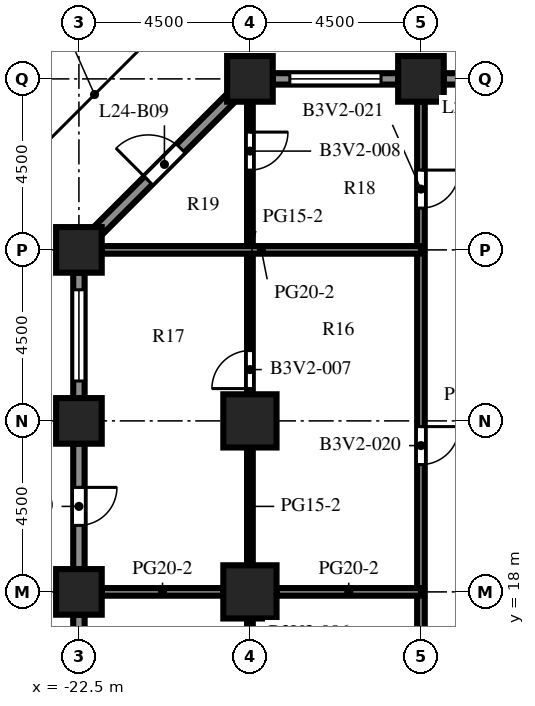
"""IFC4 building model, lengths in metres.
Left out: names, types, materials, properties, quantities, classifications, styles, units other than length and angle.
Written with IfcOpenShell. Run it as: python <this file> out.ifc"""

import sys

from ifc_helpers import new_model, si_unit, direction, frame, frame_2d, origin, origin_2d, place, context, subcontext, project, spatial, rectangle, extrude, element, fill, save


model = new_model("IFC4")
c1 = context("Model", 3, precision=1e-05, world=origin(), true_north=direction((0.0, 1.0)))
c2 = subcontext(c1, "Body", "Model", "MODEL_VIEW")
j1 = project(units=[si_unit("LENGTHUNIT", "METRE"), si_unit("PLANEANGLEUNIT", "RADIAN")], contexts=[c1])
p1 = place(None, origin())
s1 = spatial("IfcSite", under=j1, at=p1, CompositionType="ELEMENT")
p2 = place(p1, origin())
s2 = spatial("IfcBuilding", under=s1, at=p2, CompositionType="ELEMENT")
p3 = place(p2, frame((0.0, 0.0, 106.6)))
s3 = spatial("IfcBuildingStorey", under=s2, at=p3, CompositionType="ELEMENT", Elevation=106.6)
for number, where, z_axis, x_axis in (
    (1, (-22.5, 18.0, 0.0), (0.0, 0.0, 1.0), (1.0, 0.0, 0.0)),
    (2, (-22.5, 22.5, 0.0), (0.0, 0.0, 1.0), (1.0, 0.0, 0.0)),
    (3, (-22.5, 27.0, 0.0), (0.0, 0.0, 1.0), (1.0, 0.0, 0.0)),
    (4, (-18.0, 31.5, 0.0), (0.0, 0.0, 1.0), (1.0, 0.0, 0.0)),
    (5, (-13.5, 31.5, 0.0), (0.0, 0.0, 1.0), (1.0, 0.0, 0.0)),
):
    element("IfcColumn", number, at=place(p3, frame(where, z_axis=z_axis, x_axis=x_axis)), inside=s3, PredefinedType="COLUMN", context=c2, shape_type="SweptSolid", body=[
        extrude(rectangle(XDim=1.2, YDim=1.2, at=origin_2d()), origin(), (0.0, 0.0, 1.0), 4.1),
    ])
for number, where, z_axis, x_axis in (
    (6, (-18.0, 18.0, 0.0), (0.0, 0.0, 1.0), (1.0, 0.0, 0.0)),
    (7, (-18.0, 22.5, 0.0), (0.0, 0.0, 1.0), (1.0, 0.0, 0.0)),
):
    element("IfcColumn", number, at=place(p3, frame(where, z_axis=z_axis, x_axis=x_axis)), inside=s3, PredefinedType="COLUMN", context=c2, shape_type="SweptSolid", body=[
        extrude(rectangle(XDim=1.4, YDim=1.4, at=origin_2d()), origin(), (0.0, 0.0, 1.0), 4.1),
    ])
p4 = place(p3, frame((-12.9, 31.5, 0.0), z_axis=(0.0, 0.0, 1.0), x_axis=(1.0, 0.0, 0.0)))
e8 = element("IfcWall", 8, at=p4, inside=s3, PredefinedType="SOLIDWALL", context=c2, shape_type="SweptSolid", body=[
    extrude(rectangle(XDim=3.3, YDim=0.3, at=frame_2d((1.65, 0.0))), origin(), (0.0, 0.0, 1.0), 2.6),
])
p5 = place(p4, frame((1.15, 0.0, 0.0)))
e9 = element("IfcOpeningElement", 9, at=p5, cuts=e8, PredefinedType="OPENING", context=c2, shape_type="SweptSolid", body=[
    extrude(rectangle(XDim=1.0, YDim=2.2, at=frame_2d((0.5, 1.1))), frame((0.0, 0.16, 0.0), z_axis=(0.0, -1.0, 0.0), x_axis=(1.0, 0.0, 0.0)), (0.0, 0.0, 1.0), 0.32),
])
p6 = place(p3, frame((-17.4, 31.5, 0.0), z_axis=(0.0, 0.0, 1.0), x_axis=(1.0, 0.0, 0.0)))
e10 = element("IfcWall", 10, at=p6, inside=s3, PredefinedType="SOLIDWALL", context=c2, shape_type="SweptSolid", body=[
    extrude(rectangle(XDim=3.3, YDim=0.3, at=frame_2d((1.65, 0.0))), origin(), (0.0, 0.0, 1.0), 2.6),
])
p7 = place(p6, frame((0.45, 0.0, 0.8)))
e11 = element("IfcOpeningElement", 11, at=p7, cuts=e10, PredefinedType="OPENING", context=c2, shape_type="SweptSolid", body=[
    extrude(rectangle(XDim=2.4, YDim=1.7, at=frame_2d((1.2, 0.85))), frame((0.0, 0.16, 0.0), z_axis=(0.0, -1.0, 0.0), x_axis=(1.0, 0.0, 0.0)), (0.0, 0.0, 1.0), 0.32),
])
p8 = place(p3, frame((-22.006, 27.494, 0.0), z_axis=(0.0, 0.0, 1.0), x_axis=(0.707106781187, 0.707106781187, 0.0)))
e12 = element("IfcWall", 12, at=p8, inside=s3, PredefinedType="SOLIDWALL", context=c2, shape_type="SweptSolid", body=[
    extrude(rectangle(XDim=4.967, YDim=0.3, at=frame_2d((2.483, 0.0))), origin(), (0.0, 0.0, 1.0), 2.6),
])
p9 = place(p8, frame((1.884, 0.0, 0.0)))
e13 = element("IfcOpeningElement", 13, at=p9, cuts=e12, PredefinedType="OPENING", context=c2, shape_type="SweptSolid", body=[
    extrude(rectangle(XDim=1.2, YDim=2.2, at=frame_2d((0.6, 1.1))), frame((0.0, 0.16, 0.0), z_axis=(0.0, -1.0, 0.0), x_axis=(1.0, 0.0, 0.0)), (0.0, 0.0, 1.0), 0.32),
])
p10 = place(p3, frame((-22.5, 23.1, 0.0), z_axis=(0.0, 0.0, 1.0), x_axis=(0.0, 1.0, 0.0)))
e14 = element("IfcWall", 14, at=p10, inside=s3, PredefinedType="SOLIDWALL", context=c2, shape_type="SweptSolid", body=[
    extrude(rectangle(XDim=3.3, YDim=0.3, at=frame_2d((1.65, 0.0))), origin(), (0.0, 0.0, 1.0), 2.6),
])
p11 = place(p10, frame((0.45, 0.0, 0.8)))
e15 = element("IfcOpeningElement", 15, at=p11, cuts=e14, PredefinedType="OPENING", context=c2, shape_type="SweptSolid", body=[
    extrude(rectangle(XDim=2.4, YDim=1.7, at=frame_2d((1.2, 0.85))), frame((0.0, 0.16, 0.0), z_axis=(0.0, -1.0, 0.0), x_axis=(1.0, 0.0, 0.0)), (0.0, 0.0, 1.0), 0.32),
])
p12 = place(p3, frame((-22.5, 18.6, 0.0), z_axis=(0.0, 0.0, 1.0), x_axis=(0.0, 1.0, 0.0)))
e16 = element("IfcWall", 16, at=p12, inside=s3, PredefinedType="SOLIDWALL", context=c2, shape_type="SweptSolid", body=[
    extrude(rectangle(XDim=3.3, YDim=0.3, at=frame_2d((1.65, 0.0))), origin(), (0.0, 0.0, 1.0), 2.6),
])
p13 = place(p12, frame((1.15, 0.0, 0.0)))
e17 = element("IfcOpeningElement", 17, at=p13, cuts=e16, PredefinedType="OPENING", context=c2, shape_type="SweptSolid", body=[
    extrude(rectangle(XDim=1.0, YDim=2.2, at=frame_2d((0.5, 1.1))), frame((0.0, 0.16, 0.0), z_axis=(0.0, -1.0, 0.0), x_axis=(1.0, 0.0, 0.0)), (0.0, 0.0, 1.0), 0.32),
])
p14 = place(p3, frame((-22.5, 14.1, 0.0), z_axis=(0.0, 0.0, 1.0), x_axis=(0.0, 1.0, 0.0)))
e18 = element("IfcWall", 18, at=p14, inside=s3, PredefinedType="SOLIDWALL", context=c2, shape_type="SweptSolid", body=[
    extrude(rectangle(XDim=3.3, YDim=0.3, at=frame_2d((1.65, 0.0))), origin(), (0.0, 0.0, 1.0), 2.6),
])
p15 = place(p14, frame((0.45, 0.0, 0.8)))
e19 = element("IfcOpeningElement", 19, at=p15, cuts=e18, PredefinedType="OPENING", context=c2, shape_type="SweptSolid", body=[
    extrude(rectangle(XDim=2.4, YDim=1.7, at=frame_2d((1.2, 0.85))), frame((0.0, 0.16, 0.0), z_axis=(0.0, -1.0, 0.0), x_axis=(1.0, 0.0, 0.0)), (0.0, 0.0, 1.0), 0.32),
])
p16 = place(p3, frame((-18.0, 9.7, 0.0), z_axis=(0.0, 0.0, 1.0), x_axis=(0.0, 1.0, 0.0)))
e20 = element("IfcWall", 20, at=p16, inside=s3, PredefinedType="PARTITIONING", context=c2, shape_type="SweptSolid", body=[
    extrude(rectangle(XDim=7.6, YDim=0.15, at=frame_2d((3.8, 0.0))), origin(), (0.0, 0.0, 1.0), 3.5),
])
p17 = place(p16, frame((5.15, 0.0, 0.0)))
e21 = element("IfcOpeningElement", 21, at=p17, cuts=e20, PredefinedType="OPENING", context=c2, shape_type="SweptSolid", body=[
    extrude(rectangle(XDim=1.0, YDim=2.1, at=frame_2d((0.5, 1.05))), frame((0.0, 0.085, 0.0), z_axis=(0.0, -1.0, 0.0), x_axis=(1.0, 0.0, 0.0)), (0.0, 0.0, 1.0), 0.17),
])
p18 = place(p3, frame((-18.0, 18.7, 0.0), z_axis=(0.0, 0.0, 1.0), x_axis=(0.0, 1.0, 0.0)))
e22 = element("IfcWall", 22, at=p18, inside=s3, PredefinedType="PARTITIONING", context=c2, shape_type="SweptSolid", body=[
    extrude(rectangle(XDim=3.1, YDim=0.15, at=frame_2d((1.55, 0.0))), origin(), (0.0, 0.0, 1.0), 3.5),
])
p19 = place(p3, frame((-18.0, 23.2, 0.0), z_axis=(0.0, 0.0, 1.0), x_axis=(0.0, 1.0, 0.0)))
e23 = element("IfcWall", 23, at=p19, inside=s3, PredefinedType="PARTITIONING", context=c2, shape_type="SweptSolid", body=[
    extrude(rectangle(XDim=7.7, YDim=0.15, at=frame_2d((3.85, 0.0))), origin(), (0.0, 0.0, 1.0), 3.5),
])
p20 = place(p19, frame((0.15, 0.0, 0.0)))
e24 = element("IfcOpeningElement", 24, at=p20, cuts=e23, PredefinedType="OPENING", context=c2, shape_type="SweptSolid", body=[
    extrude(rectangle(XDim=1.0, YDim=2.1, at=frame_2d((0.5, 1.05))), frame((0.0, 0.085, 0.0), z_axis=(0.0, -1.0, 0.0), x_axis=(1.0, 0.0, 0.0)), (0.0, 0.0, 1.0), 0.17),
])
p21 = place(p19, frame((5.9, 0.0, 0.0)))
e25 = element("IfcOpeningElement", 25, at=p21, cuts=e23, PredefinedType="OPENING", context=c2, shape_type="SweptSolid", body=[
    extrude(rectangle(XDim=1.0, YDim=2.1, at=frame_2d((0.5, 1.05))), frame((0.0, 0.085, 0.0), z_axis=(0.0, -1.0, 0.0), x_axis=(1.0, 0.0, 0.0)), (0.0, 0.0, 1.0), 0.17),
])
p22 = place(p3, frame((-13.5, -21.9, 0.0), z_axis=(0.0, 0.0, 1.0), x_axis=(0.0, 1.0, 0.0)))
e26 = element("IfcWall", 26, at=p22, inside=s3, PredefinedType="PARTITIONING", context=c2, shape_type="SweptSolid", body=[
    extrude(rectangle(XDim=52.8, YDim=0.2, at=frame_2d((26.4, 0.0))), origin(), (0.0, 0.0, 1.0), 3.5),
])
p23 = place(p22, frame((0.75, 0.0, 0.0)))
e27 = element("IfcOpeningElement", 27, at=p23, cuts=e26, PredefinedType="OPENING", context=c2, shape_type="SweptSolid", body=[
    extrude(rectangle(XDim=1.0, YDim=2.1, at=frame_2d((0.5, 1.05))), frame((0.0, 0.11, 0.0), z_axis=(0.0, -1.0, 0.0), x_axis=(1.0, 0.0, 0.0)), (0.0, 0.0, 1.0), 0.22),
])
p24 = place(p22, frame((5.0, 0.0, 0.0)))
e28 = element("IfcOpeningElement", 28, at=p24, cuts=e26, PredefinedType="OPENING", context=c2, shape_type="SweptSolid", body=[
    extrude(rectangle(XDim=1.0, YDim=2.1, at=frame_2d((0.5, 1.05))), frame((0.0, 0.11, 0.0), z_axis=(0.0, -1.0, 0.0), x_axis=(1.0, 0.0, 0.0)), (0.0, 0.0, 1.0), 0.22),
])
p25 = place(p22, frame((12.5, 0.0, 0.0)))
e29 = element("IfcOpeningElement", 29, at=p25, cuts=e26, PredefinedType="OPENING", context=c2, shape_type="SweptSolid", body=[
    extrude(rectangle(XDim=1.0, YDim=2.1, at=frame_2d((0.5, 1.05))), frame((0.0, 0.11, 0.0), z_axis=(0.0, -1.0, 0.0), x_axis=(1.0, 0.0, 0.0)), (0.0, 0.0, 1.0), 0.22),
])
p26 = place(p22, frame((19.75, 0.0, 0.0)))
e30 = element("IfcOpeningElement", 30, at=p26, cuts=e26, PredefinedType="OPENING", context=c2, shape_type="SweptSolid", body=[
    extrude(rectangle(XDim=1.0, YDim=2.1, at=frame_2d((0.5, 1.05))), frame((0.0, 0.11, 0.0), z_axis=(0.0, -1.0, 0.0), x_axis=(1.0, 0.0, 0.0)), (0.0, 0.0, 1.0), 0.22),
])
p27 = place(p22, frame((26.0, 0.0, 0.0)))
e31 = element("IfcOpeningElement", 31, at=p27, cuts=e26, PredefinedType="OPENING", context=c2, shape_type="SweptSolid", body=[
    extrude(rectangle(XDim=1.0, YDim=2.1, at=frame_2d((0.5, 1.05))), frame((0.0, 0.11, 0.0), z_axis=(0.0, -1.0, 0.0), x_axis=(1.0, 0.0, 0.0)), (0.0, 0.0, 1.0), 0.22),
])
p28 = place(p22, frame((37.5, 0.0, 0.0)))
e32 = element("IfcOpeningElement", 32, at=p28, cuts=e26, PredefinedType="OPENING", context=c2, shape_type="SweptSolid", body=[
    extrude(rectangle(XDim=1.0, YDim=2.1, at=frame_2d((0.5, 1.05))), frame((0.0, 0.11, 0.0), z_axis=(0.0, -1.0, 0.0), x_axis=(1.0, 0.0, 0.0)), (0.0, 0.0, 1.0), 0.22),
])
p29 = place(p22, frame((43.25, 0.0, 0.0)))
e33 = element("IfcOpeningElement", 33, at=p29, cuts=e26, PredefinedType="OPENING", context=c2, shape_type="SweptSolid", body=[
    extrude(rectangle(XDim=1.0, YDim=2.1, at=frame_2d((0.5, 1.05))), frame((0.0, 0.11, 0.0), z_axis=(0.0, -1.0, 0.0), x_axis=(1.0, 0.0, 0.0)), (0.0, 0.0, 1.0), 0.22),
])
p30 = place(p22, frame((50.0, 0.0, 0.0)))
e34 = element("IfcOpeningElement", 34, at=p30, cuts=e26, PredefinedType="OPENING", context=c2, shape_type="SweptSolid", body=[
    extrude(rectangle(XDim=1.0, YDim=2.1, at=frame_2d((0.5, 1.05))), frame((0.0, 0.11, 0.0), z_axis=(0.0, -1.0, 0.0), x_axis=(1.0, 0.0, 0.0)), (0.0, 0.0, 1.0), 0.22),
])
p31 = place(p3, frame((-21.9, 18.0, 0.0), z_axis=(0.0, 0.0, 1.0), x_axis=(1.0, 0.0, 0.0)))
e35 = element("IfcWall", 35, at=p31, inside=s3, PredefinedType="PARTITIONING", context=c2, shape_type="SweptSolid", body=[
    extrude(rectangle(XDim=3.2, YDim=0.2, at=frame_2d((1.6, 0.0))), origin(), (0.0, 0.0, 1.0), 3.5),
])
p32 = place(p3, frame((-17.3, 18.0, 0.0), z_axis=(0.0, 0.0, 1.0), x_axis=(1.0, 0.0, 0.0)))
e36 = element("IfcWall", 36, at=p32, inside=s3, PredefinedType="PARTITIONING", context=c2, shape_type="SweptSolid", body=[
    extrude(rectangle(XDim=3.8, YDim=0.2, at=frame_2d((1.9, 0.0))), origin(), (0.0, 0.0, 1.0), 3.5),
])
p33 = place(p3, frame((-21.9, 27.0, 0.0), z_axis=(0.0, 0.0, 1.0), x_axis=(1.0, 0.0, 0.0)))
e37 = element("IfcWall", 37, at=p33, inside=s3, PredefinedType="PARTITIONING", context=c2, shape_type="SweptSolid", body=[
    extrude(rectangle(XDim=8.4, YDim=0.2, at=frame_2d((4.2, 0.0))), origin(), (0.0, 0.0, 1.0), 3.5),
])
p34 = place(p7, origin())
e38 = element("IfcWindow", 38, at=p34, inside=s3, PartitioningType="SINGLE_PANEL", PredefinedType="WINDOW", context=c2, shape_type="SweptSolid", body=[
    extrude(rectangle(XDim=2.4, YDim=1.7, at=frame_2d((1.2, 0.85))), frame((0.0, 0.03, 0.0), z_axis=(0.0, -1.0, 0.0), x_axis=(1.0, 0.0, 0.0)), (0.0, 0.0, 1.0), 0.06),
])
fill(e11, e38)
p35 = place(p9, origin())
e39 = element("IfcDoor", 39, at=p35, inside=s3, OperationType="SINGLE_SWING_LEFT", PredefinedType="DOOR", context=c2, shape_type="SweptSolid", body=[
    extrude(rectangle(XDim=1.2, YDim=2.2, at=frame_2d((0.6, 1.1))), frame((0.0, 0.025, 0.0), z_axis=(0.0, -1.0, 0.0), x_axis=(1.0, 0.0, 0.0)), (0.0, 0.0, 1.0), 0.05),
])
fill(e13, e39)
p36 = place(p11, origin())
e40 = element("IfcWindow", 40, at=p36, inside=s3, PartitioningType="SINGLE_PANEL", PredefinedType="WINDOW", context=c2, shape_type="SweptSolid", body=[
    extrude(rectangle(XDim=2.4, YDim=1.7, at=frame_2d((1.2, 0.85))), frame((0.0, 0.03, 0.0), z_axis=(0.0, -1.0, 0.0), x_axis=(1.0, 0.0, 0.0)), (0.0, 0.0, 1.0), 0.06),
])
fill(e15, e40)
p37 = place(p13, origin())
e41 = element("IfcDoor", 41, at=p37, inside=s3, OperationType="SINGLE_SWING_RIGHT", PredefinedType="DOOR", context=c2, shape_type="SweptSolid", body=[
    extrude(rectangle(XDim=1.0, YDim=2.2, at=frame_2d((0.5, 1.1))), frame((0.0, 0.025, 0.0), z_axis=(0.0, -1.0, 0.0), x_axis=(1.0, 0.0, 0.0)), (0.0, 0.0, 1.0), 0.05),
])
fill(e17, e41)
p38 = place(p20, origin())
e42 = element("IfcDoor", 42, at=p38, inside=s3, OperationType="SINGLE_SWING_LEFT", PredefinedType="DOOR", context=c2, shape_type="SweptSolid", body=[
    extrude(rectangle(XDim=1.0, YDim=2.1, at=frame_2d((0.5, 1.05))), frame((0.0, 0.025, 0.0), z_axis=(0.0, -1.0, 0.0), x_axis=(1.0, 0.0, 0.0)), (0.0, 0.0, 1.0), 0.05),
])
fill(e24, e42)
p39 = place(p21, origin())
e43 = element("IfcDoor", 43, at=p39, inside=s3, OperationType="SINGLE_SWING_RIGHT", PredefinedType="DOOR", context=c2, shape_type="SweptSolid", body=[
    extrude(rectangle(XDim=1.0, YDim=2.1, at=frame_2d((0.5, 1.05))), frame((0.0, 0.025, 0.0), z_axis=(0.0, -1.0, 0.0), x_axis=(1.0, 0.0, 0.0)), (0.0, 0.0, 1.0), 0.05),
])
fill(e25, e43)
p40 = place(p29, origin())
e44 = element("IfcDoor", 44, at=p40, inside=s3, OperationType="SINGLE_SWING_RIGHT", PredefinedType="DOOR", context=c2, shape_type="SweptSolid", body=[
    extrude(rectangle(XDim=1.0, YDim=2.1, at=frame_2d((0.5, 1.05))), frame((0.0, 0.025, 0.0), z_axis=(0.0, -1.0, 0.0), x_axis=(1.0, 0.0, 0.0)), (0.0, 0.0, 1.0), 0.05),
])
fill(e33, e44)
p41 = place(p30, origin())
e45 = element("IfcDoor", 45, at=p41, inside=s3, OperationType="SINGLE_SWING_RIGHT", PredefinedType="DOOR", context=c2, shape_type="SweptSolid", body=[
    extrude(rectangle(XDim=1.0, YDim=2.1, at=frame_2d((0.5, 1.05))), frame((0.0, 0.025, 0.0), z_axis=(0.0, -1.0, 0.0), x_axis=(1.0, 0.0, 0.0)), (0.0, 0.0, 1.0), 0.05),
])
fill(e34, e45)
save(model, sys.argv[1])
